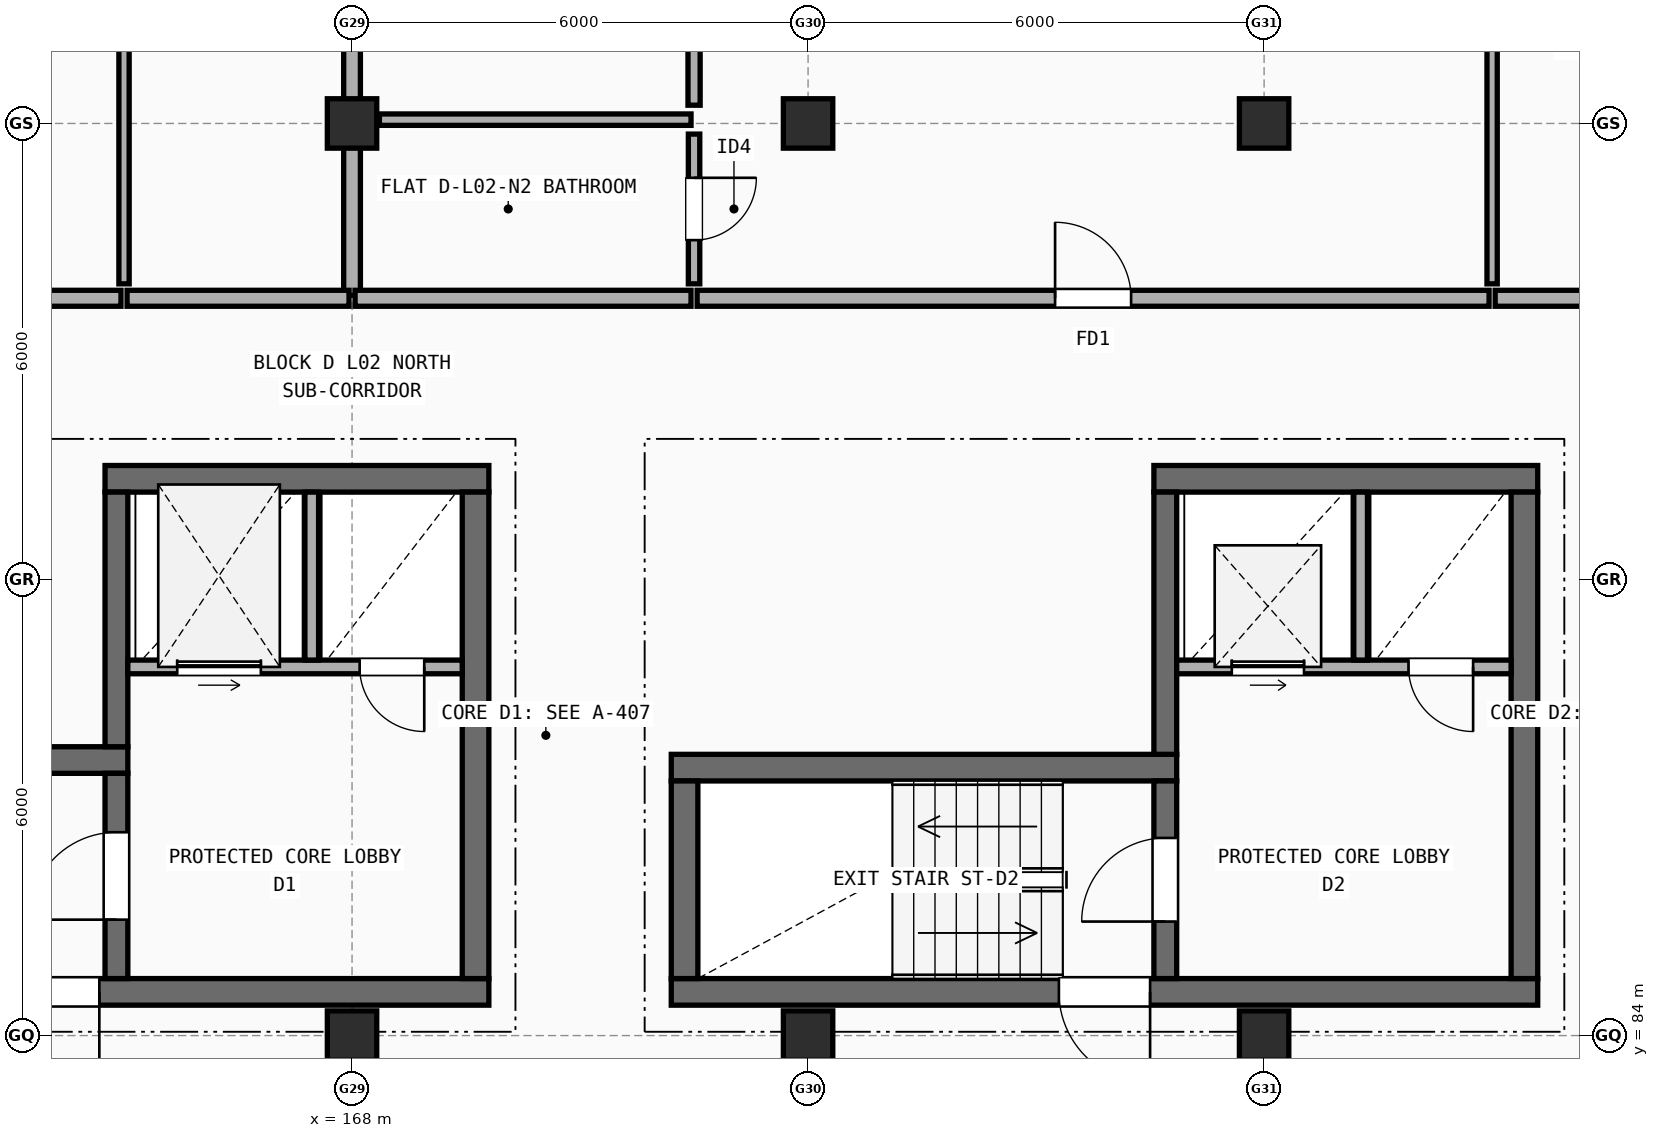
"""IFC4 building model, lengths in metres.
Left out: names, types, materials, properties, quantities, classifications, styles, units other than length and angle.
Written with IfcOpenShell. Run it as: python <this file> out.ifc"""

import sys

from ifc_helpers import new_model, si_unit, direction, frame, frame_2d, origin, origin_2d, place, context, subcontext, project, spatial, rectangle, extrude, element, fill, save


model = new_model("IFC4")
c1 = context("Model", 3, precision=1e-05, world=origin(), true_north=direction((0.0, 1.0)))
c2 = subcontext(c1, "Body", "Model", "MODEL_VIEW")
j1 = project(units=[si_unit("LENGTHUNIT", "METRE"), si_unit("PLANEANGLEUNIT", "RADIAN")], contexts=[c1])
p1 = place(None, origin())
s1 = spatial("IfcSite", under=j1, at=p1, CompositionType="ELEMENT")
p2 = place(p1, origin())
s2 = spatial("IfcBuilding", under=s1, at=p2, CompositionType="ELEMENT")
p3 = place(p2, frame((0.0, 0.0, 7.7)))
s3 = spatial("IfcBuildingStorey", under=s2, at=p3, CompositionType="ELEMENT", Elevation=7.7)
for number, where, z_axis, x_axis in (
    (1, (168.0, 84.0, 0.0), (0.0, 0.0, 1.0), (1.0, 0.0, 0.0)),
    (2, (168.0, 96.0, 0.0), (0.0, 0.0, 1.0), (1.0, 0.0, 0.0)),
    (3, (174.0, 84.0, 0.0), (0.0, 0.0, 1.0), (1.0, 0.0, 0.0)),
    (4, (174.0, 96.0, 0.0), (0.0, 0.0, 1.0), (1.0, 0.0, 0.0)),
    (5, (180.0, 84.0, 0.0), (0.0, 0.0, 1.0), (1.0, 0.0, 0.0)),
    (6, (180.0, 96.0, 0.0), (0.0, 0.0, 1.0), (1.0, 0.0, 0.0)),
):
    element("IfcColumn", number, at=place(p3, frame(where, z_axis=z_axis, x_axis=x_axis)), inside=s3, PredefinedType="COLUMN", context=c2, shape_type="SweptSolid", body=[
        extrude(rectangle(XDim=0.65, YDim=0.65, at=origin_2d()), origin(), (0.0, 0.0, 1.0), 2.955),
    ])
p4 = place(p3, frame((158.4, 84.575, 0.0), z_axis=(0.0, 0.0, 1.0), x_axis=(1.0, 0.0, 0.0)))
e7 = element("IfcWall", 7, at=p4, inside=s3, PredefinedType="SHEAR", context=c2, shape_type="SweptSolid", body=[
    extrude(rectangle(XDim=11.4, YDim=0.35, at=frame_2d((5.7, 0.0))), origin(), (0.0, 0.0, 1.0), 2.955),
])
p5 = place(p4, frame((5.125, 0.0, 0.0)))
e8 = element("IfcOpeningElement", 8, at=p5, cuts=e7, PredefinedType="OPENING", context=c2, shape_type="SweptSolid", body=[
    extrude(rectangle(XDim=1.15, YDim=2.15, at=frame_2d((0.575, 1.075))), frame((0.0, 0.185, 0.0), z_axis=(0.0, -1.0, 0.0), x_axis=(1.0, 0.0, 0.0)), (0.0, 0.0, 1.0), 0.37),
])
p6 = place(p3, frame((165.05, 87.625, 0.0), z_axis=(0.0, 0.0, 1.0), x_axis=(-1.0, 0.0, 0.0)))
e9 = element("IfcWall", 9, at=p6, inside=s3, PredefinedType="SHEAR", context=c2, shape_type="SweptSolid", body=[
    extrude(rectangle(XDim=6.65, YDim=0.35, at=frame_2d((3.325, 0.0))), origin(), (0.0, 0.0, 1.0), 2.955),
])
p7 = place(p3, frame((164.9, 84.75, 0.0), z_axis=(0.0, 0.0, 1.0), x_axis=(0.0, 1.0, 0.0)))
e10 = element("IfcWall", 10, at=p7, inside=s3, PredefinedType="SHEAR", context=c2, shape_type="SweptSolid", body=[
    extrude(rectangle(XDim=2.7, YDim=0.3, at=frame_2d((1.35, 0.0))), origin(), (0.0, 0.0, 1.0), 2.955),
])
p8 = place(p7, frame((0.775, 0.0, 0.0)))
e11 = element("IfcOpeningElement", 11, at=p8, cuts=e10, PredefinedType="OPENING", context=c2, shape_type="SweptSolid", body=[
    extrude(rectangle(XDim=1.15, YDim=2.15, at=frame_2d((0.575, 1.075))), frame((0.0, 0.16, 0.0), z_axis=(0.0, -1.0, 0.0), x_axis=(1.0, 0.0, 0.0)), (0.0, 0.0, 1.0), 0.32),
])
p9 = place(p3, frame((169.8, 91.325, 0.0), z_axis=(0.0, 0.0, 1.0), x_axis=(-1.0, 0.0, 0.0)))
e12 = element("IfcWall", 12, at=p9, inside=s3, PredefinedType="SHEAR", context=c2, shape_type="SweptSolid", body=[
    extrude(rectangle(XDim=5.05, YDim=0.35, at=frame_2d((2.525, 0.0))), origin(), (0.0, 0.0, 1.0), 2.955),
])
p10 = place(p3, frame((169.625, 84.75, 0.0), z_axis=(0.0, 0.0, 1.0), x_axis=(0.0, 1.0, 0.0)))
e13 = element("IfcWall", 13, at=p10, inside=s3, PredefinedType="SHEAR", context=c2, shape_type="SweptSolid", body=[
    extrude(rectangle(XDim=6.4, YDim=0.35, at=frame_2d((3.2, 0.0))), origin(), (0.0, 0.0, 1.0), 2.955),
])
p11 = place(p3, frame((164.9, 87.8, 0.0), z_axis=(0.0, 0.0, 1.0), x_axis=(0.0, 1.0, 0.0)))
e14 = element("IfcWall", 14, at=p11, inside=s3, PredefinedType="SHEAR", context=c2, shape_type="SweptSolid", body=[
    extrude(rectangle(XDim=3.35, YDim=0.3, at=frame_2d((1.675, 0.0))), origin(), (0.0, 0.0, 1.0), 2.955),
])
p12 = place(p3, frame((165.05, 88.85, 0.0), z_axis=(0.0, 0.0, 1.0), x_axis=(1.0, 0.0, 0.0)))
e15 = element("IfcWall", 15, at=p12, inside=s3, PredefinedType="SOLIDWALL", context=c2, shape_type="SweptSolid", body=[
    extrude(rectangle(XDim=4.4, YDim=0.18, at=frame_2d((2.2, 0.0))), origin(), (0.0, 0.0, 1.0), 2.955),
])
p13 = place(p12, frame((0.65, 0.0, 0.0)))
e16 = element("IfcOpeningElement", 16, at=p13, cuts=e15, PredefinedType="OPENING", context=c2, shape_type="SweptSolid", body=[
    extrude(rectangle(XDim=1.1, YDim=2.15, at=frame_2d((0.55, 1.075))), frame((0.0, 0.1, 0.0), z_axis=(0.0, -1.0, 0.0), x_axis=(1.0, 0.0, 0.0)), (0.0, 0.0, 1.0), 0.2),
])
p14 = place(p12, frame((3.05, 0.0, 0.0)))
e17 = element("IfcOpeningElement", 17, at=p14, cuts=e15, PredefinedType="OPENING", context=c2, shape_type="SweptSolid", body=[
    extrude(rectangle(XDim=0.85, YDim=2.1, at=frame_2d((0.425, 1.05))), frame((0.0, 0.1, 0.0), z_axis=(0.0, -1.0, 0.0), x_axis=(1.0, 0.0, 0.0)), (0.0, 0.0, 1.0), 0.2),
])
p15 = place(p3, frame((167.47, 88.94, 0.0), z_axis=(0.0, 0.0, 1.0), x_axis=(0.0, 1.0, 0.0)))
e18 = element("IfcWall", 18, at=p15, inside=s3, PredefinedType="SOLIDWALL", context=c2, shape_type="SweptSolid", body=[
    extrude(rectangle(XDim=2.21, YDim=0.18, at=frame_2d((1.105, 0.0))), origin(), (0.0, 0.0, 1.0), 2.955),
])
p16 = place(p3, frame((172.2, 84.575, 0.0), z_axis=(0.0, 0.0, 1.0), x_axis=(1.0, 0.0, 0.0)))
e19 = element("IfcWall", 19, at=p16, inside=s3, PredefinedType="SHEAR", context=c2, shape_type="SweptSolid", body=[
    extrude(rectangle(XDim=11.4, YDim=0.35, at=frame_2d((5.7, 0.0))), origin(), (0.0, 0.0, 1.0), 2.955),
])
p17 = place(p16, frame((5.1, 0.0, 0.0)))
e20 = element("IfcOpeningElement", 20, at=p17, cuts=e19, PredefinedType="OPENING", context=c2, shape_type="SweptSolid", body=[
    extrude(rectangle(XDim=1.2, YDim=2.15, at=frame_2d((0.6, 1.075))), frame((0.0, 0.185, 0.0), z_axis=(0.0, -1.0, 0.0), x_axis=(1.0, 0.0, 0.0)), (0.0, 0.0, 1.0), 0.37),
])
p18 = place(p3, frame((178.85, 87.525, 0.0), z_axis=(0.0, 0.0, 1.0), x_axis=(-1.0, 0.0, 0.0)))
e21 = element("IfcWall", 21, at=p18, inside=s3, PredefinedType="SHEAR", context=c2, shape_type="SweptSolid", body=[
    extrude(rectangle(XDim=6.65, YDim=0.35, at=frame_2d((3.325, 0.0))), origin(), (0.0, 0.0, 1.0), 2.955),
])
p19 = place(p3, frame((172.375, 87.35, 0.0), z_axis=(0.0, 0.0, 1.0), x_axis=(0.0, -1.0, 0.0)))
e22 = element("IfcWall", 22, at=p19, inside=s3, PredefinedType="SHEAR", context=c2, shape_type="SweptSolid", body=[
    extrude(rectangle(XDim=2.6, YDim=0.35, at=frame_2d((1.3, 0.0))), origin(), (0.0, 0.0, 1.0), 2.955),
])
p20 = place(p3, frame((178.7, 84.75, 0.0), z_axis=(0.0, 0.0, 1.0), x_axis=(0.0, 1.0, 0.0)))
e23 = element("IfcWall", 23, at=p20, inside=s3, PredefinedType="SHEAR", context=c2, shape_type="SweptSolid", body=[
    extrude(rectangle(XDim=2.6, YDim=0.3, at=frame_2d((1.3, 0.0))), origin(), (0.0, 0.0, 1.0), 2.955),
])
p21 = place(p20, frame((0.75, 0.0, 0.0)))
e24 = element("IfcOpeningElement", 24, at=p21, cuts=e23, PredefinedType="OPENING", context=c2, shape_type="SweptSolid", body=[
    extrude(rectangle(XDim=1.1, YDim=2.15, at=frame_2d((0.55, 1.075))), frame((0.0, 0.16, 0.0), z_axis=(0.0, -1.0, 0.0), x_axis=(1.0, 0.0, 0.0)), (0.0, 0.0, 1.0), 0.32),
])
p22 = place(p3, frame((183.6, 91.325, 0.0), z_axis=(0.0, 0.0, 1.0), x_axis=(-1.0, 0.0, 0.0)))
e25 = element("IfcWall", 25, at=p22, inside=s3, PredefinedType="SHEAR", context=c2, shape_type="SweptSolid", body=[
    extrude(rectangle(XDim=5.05, YDim=0.35, at=frame_2d((2.525, 0.0))), origin(), (0.0, 0.0, 1.0), 2.955),
])
p23 = place(p3, frame((183.425, 84.75, 0.0), z_axis=(0.0, 0.0, 1.0), x_axis=(0.0, 1.0, 0.0)))
e26 = element("IfcWall", 26, at=p23, inside=s3, PredefinedType="SHEAR", context=c2, shape_type="SweptSolid", body=[
    extrude(rectangle(XDim=6.4, YDim=0.35, at=frame_2d((3.2, 0.0))), origin(), (0.0, 0.0, 1.0), 2.955),
])
p24 = place(p3, frame((178.7, 87.7, 0.0), z_axis=(0.0, 0.0, 1.0), x_axis=(0.0, 1.0, 0.0)))
e27 = element("IfcWall", 27, at=p24, inside=s3, PredefinedType="SHEAR", context=c2, shape_type="SweptSolid", body=[
    extrude(rectangle(XDim=3.45, YDim=0.3, at=frame_2d((1.725, 0.0))), origin(), (0.0, 0.0, 1.0), 2.955),
])
p25 = place(p3, frame((178.85, 88.85, 0.0), z_axis=(0.0, 0.0, 1.0), x_axis=(1.0, 0.0, 0.0)))
e28 = element("IfcWall", 28, at=p25, inside=s3, PredefinedType="SOLIDWALL", context=c2, shape_type="SweptSolid", body=[
    extrude(rectangle(XDim=4.4, YDim=0.18, at=frame_2d((2.2, 0.0))), origin(), (0.0, 0.0, 1.0), 2.955),
])
p26 = place(p25, frame((0.725, 0.0, 0.0)))
e29 = element("IfcOpeningElement", 29, at=p26, cuts=e28, PredefinedType="OPENING", context=c2, shape_type="SweptSolid", body=[
    extrude(rectangle(XDim=0.95, YDim=2.15, at=frame_2d((0.475, 1.075))), frame((0.0, 0.1, 0.0), z_axis=(0.0, -1.0, 0.0), x_axis=(1.0, 0.0, 0.0)), (0.0, 0.0, 1.0), 0.2),
])
p27 = place(p25, frame((3.05, 0.0, 0.0)))
e30 = element("IfcOpeningElement", 30, at=p27, cuts=e28, PredefinedType="OPENING", context=c2, shape_type="SweptSolid", body=[
    extrude(rectangle(XDim=0.85, YDim=2.1, at=frame_2d((0.425, 1.05))), frame((0.0, 0.1, 0.0), z_axis=(0.0, -1.0, 0.0), x_axis=(1.0, 0.0, 0.0)), (0.0, 0.0, 1.0), 0.2),
])
p28 = place(p3, frame((181.27, 88.94, 0.0), z_axis=(0.0, 0.0, 1.0), x_axis=(0.0, 1.0, 0.0)))
e31 = element("IfcWall", 31, at=p28, inside=s3, PredefinedType="SOLIDWALL", context=c2, shape_type="SweptSolid", body=[
    extrude(rectangle(XDim=2.21, YDim=0.18, at=frame_2d((1.105, 0.0))), origin(), (0.0, 0.0, 1.0), 2.955),
])
p29 = place(p3, frame((168.0, 93.74, 0.0), z_axis=(0.0, 0.0, 1.0), x_axis=(0.0, 1.0, 0.0)))
e32 = element("IfcWall", 32, at=p29, inside=s3, PredefinedType="SOLIDWALL", context=c2, shape_type="SweptSolid", body=[
    extrude(rectangle(XDim=13.87, YDim=0.22, at=frame_2d((6.935, 0.0))), origin(), (0.0, 0.0, 1.0), 2.337),
])
p30 = place(p3, frame((154.54, 93.7, 0.0), z_axis=(0.0, 0.0, 1.0), x_axis=(1.0, 0.0, 0.0)))
e33 = element("IfcWall", 33, at=p30, inside=s3, PredefinedType="SOLIDWALL", context=c2, shape_type="SweptSolid", body=[
    extrude(rectangle(XDim=10.42, YDim=0.21, at=frame_2d((5.21, 0.0))), origin(), (0.0, 0.0, 1.0), 2.437),
])
p31 = place(p30, frame((4.72, 0.0, 0.0)))
e34 = element("IfcOpeningElement", 34, at=p31, cuts=e33, PredefinedType="OPENING", context=c2, shape_type="SweptSolid", body=[
    extrude(rectangle(XDim=0.98, YDim=2.15, at=frame_2d((0.49, 1.075))), frame((0.0, 0.115, 0.0), z_axis=(0.0, -1.0, 0.0), x_axis=(1.0, 0.0, 0.0)), (0.0, 0.0, 1.0), 0.23),
])
p32 = place(p3, frame((165.04, 93.7, 0.0), z_axis=(0.0, 0.0, 1.0), x_axis=(1.0, 0.0, 0.0)))
e35 = element("IfcWall", 35, at=p32, inside=s3, PredefinedType="SOLIDWALL", context=c2, shape_type="SweptSolid", body=[
    extrude(rectangle(XDim=2.92, YDim=0.21, at=frame_2d((1.46, 0.0))), origin(), (0.0, 0.0, 1.0), 2.508),
])
p33 = place(p3, frame((165.0, 93.89, 0.0), z_axis=(0.0, 0.0, 1.0), x_axis=(0.0, 1.0, 0.0)))
e36 = element("IfcWall", 36, at=p33, inside=s3, PredefinedType="PARTITIONING", context=c2, shape_type="SweptSolid", body=[
    extrude(rectangle(XDim=13.92, YDim=0.135, at=frame_2d((6.96, 0.0))), origin(), (0.0, 0.0, 1.0), 2.387),
])
p34 = place(p33, frame((6.65, 0.0, 0.0)))
e37 = element("IfcOpeningElement", 37, at=p34, cuts=e36, PredefinedType="OPENING", context=c2, shape_type="SweptSolid", body=[
    extrude(rectangle(XDim=0.9, YDim=2.1, at=frame_2d((0.45, 1.05))), frame((0.0, 0.077, 0.0), z_axis=(0.0, -1.0, 0.0), x_axis=(1.0, 0.0, 0.0)), (0.0, 0.0, 1.0), 0.155),
])
p35 = place(p3, frame((168.04, 93.7, 0.0), z_axis=(0.0, 0.0, 1.0), x_axis=(1.0, 0.0, 0.0)))
e38 = element("IfcWall", 38, at=p35, inside=s3, PredefinedType="SOLIDWALL", context=c2, shape_type="SweptSolid", body=[
    extrude(rectangle(XDim=4.42, YDim=0.21, at=frame_2d((2.21, 0.0))), origin(), (0.0, 0.0, 1.0), 2.508),
])
p36 = place(p3, frame((172.54, 93.7, 0.0), z_axis=(0.0, 0.0, 1.0), x_axis=(1.0, 0.0, 0.0)))
e39 = element("IfcWall", 39, at=p36, inside=s3, PredefinedType="SOLIDWALL", context=c2, shape_type="SweptSolid", body=[
    extrude(rectangle(XDim=10.42, YDim=0.21, at=frame_2d((5.21, 0.0))), origin(), (0.0, 0.0, 1.0), 2.955),
])
p37 = place(p36, frame((4.71, 0.0, 0.0)))
e40 = element("IfcOpeningElement", 40, at=p37, cuts=e39, PredefinedType="OPENING", context=c2, shape_type="SweptSolid", body=[
    extrude(rectangle(XDim=1.0, YDim=2.15, at=frame_2d((0.5, 1.075))), frame((0.0, 0.115, 0.0), z_axis=(0.0, -1.0, 0.0), x_axis=(1.0, 0.0, 0.0)), (0.0, 0.0, 1.0), 0.23),
])
p38 = place(p3, frame((172.5, 96.24, 0.0), z_axis=(0.0, 0.0, 1.0), x_axis=(0.0, 1.0, 0.0)))
e41 = element("IfcWall", 41, at=p38, inside=s3, PredefinedType="PLUMBINGWALL", context=c2, shape_type="SweptSolid", body=[
    extrude(rectangle(XDim=7.37, YDim=0.16, at=frame_2d((3.685, 0.0))), origin(), (0.0, 0.0, 1.0), 2.437),
])
p39 = place(p38, frame((3.245, 0.0, 0.0)))
e42 = element("IfcOpeningElement", 42, at=p39, cuts=e41, PredefinedType="OPENING", context=c2, shape_type="SweptSolid", body=[
    extrude(rectangle(XDim=0.88, YDim=2.1, at=frame_2d((0.44, 1.05))), frame((0.0, 0.09, 0.0), z_axis=(0.0, -1.0, 0.0), x_axis=(1.0, 0.0, 0.0)), (0.0, 0.0, 1.0), 0.18),
])
p40 = place(p3, frame((172.5, 93.89, 0.0), z_axis=(0.0, 0.0, 1.0), x_axis=(0.0, 1.0, 0.0)))
e43 = element("IfcWall", 43, at=p40, inside=s3, PredefinedType="PARTITIONING", context=c2, shape_type="SweptSolid", body=[
    extrude(rectangle(XDim=1.97, YDim=0.15, at=frame_2d((0.985, 0.0))), origin(), (0.0, 0.0, 1.0), 2.955),
])
p41 = place(p40, frame((0.575, 0.0, 0.0)))
e44 = element("IfcOpeningElement", 44, at=p41, cuts=e43, PredefinedType="OPENING", context=c2, shape_type="SweptSolid", body=[
    extrude(rectangle(XDim=0.82, YDim=2.08, at=frame_2d((0.41, 1.04))), frame((0.0, 0.085, 0.0), z_axis=(0.0, -1.0, 0.0), x_axis=(1.0, 0.0, 0.0)), (0.0, 0.0, 1.0), 0.17),
])
p42 = place(p3, frame((168.36, 96.05, 0.0), z_axis=(0.0, 0.0, 1.0), x_axis=(1.0, 0.0, 0.0)))
e45 = element("IfcWall", 45, at=p42, inside=s3, PredefinedType="PARTITIONING", context=c2, shape_type="SweptSolid", body=[
    extrude(rectangle(XDim=4.1, YDim=0.15, at=frame_2d((2.05, 0.0))), origin(), (0.0, 0.0, 1.0), 2.387),
])
p43 = place(p3, frame((183.04, 93.7, 0.0), z_axis=(0.0, 0.0, 1.0), x_axis=(1.0, 0.0, 0.0)))
e46 = element("IfcWall", 46, at=p43, inside=s3, PredefinedType="SOLIDWALL", context=c2, shape_type="SweptSolid", body=[
    extrude(rectangle(XDim=2.92, YDim=0.21, at=frame_2d((1.46, 0.0))), origin(), (0.0, 0.0, 1.0), 2.437),
])
p44 = place(p3, frame((183.0, 93.89, 0.0), z_axis=(0.0, 0.0, 1.0), x_axis=(0.0, 1.0, 0.0)))
e47 = element("IfcWall", 47, at=p44, inside=s3, PredefinedType="PARTITIONING", context=c2, shape_type="SweptSolid", body=[
    extrude(rectangle(XDim=13.92, YDim=0.135, at=frame_2d((6.96, 0.0))), origin(), (0.0, 0.0, 1.0), 2.387),
])
p45 = place(p44, frame((6.65, 0.0, 0.0)))
e48 = element("IfcOpeningElement", 48, at=p45, cuts=e47, PredefinedType="OPENING", context=c2, shape_type="SweptSolid", body=[
    extrude(rectangle(XDim=0.88, YDim=2.1, at=frame_2d((0.44, 1.05))), frame((0.0, 0.077, 0.0), z_axis=(0.0, -1.0, 0.0), x_axis=(1.0, 0.0, 0.0)), (0.0, 0.0, 1.0), 0.155),
])
p46 = place(p5, origin())
e49 = element("IfcDoor", 49, at=p46, inside=s3, OperationType="SINGLE_SWING_RIGHT", PredefinedType="DOOR", context=c2, shape_type="SweptSolid", body=[
    extrude(rectangle(XDim=1.15, YDim=2.15, at=frame_2d((0.575, 1.075))), frame((0.0, 0.025, 0.0), z_axis=(0.0, -1.0, 0.0), x_axis=(1.0, 0.0, 0.0)), (0.0, 0.0, 1.0), 0.05),
])
fill(e8, e49)
p47 = place(p8, origin())
e50 = element("IfcDoor", 50, at=p47, inside=s3, OperationType="SINGLE_SWING_LEFT", PredefinedType="DOOR", context=c2, shape_type="SweptSolid", body=[
    extrude(rectangle(XDim=1.15, YDim=2.15, at=frame_2d((0.575, 1.075))), frame((0.0, 0.025, 0.0), z_axis=(0.0, -1.0, 0.0), x_axis=(1.0, 0.0, 0.0)), (0.0, 0.0, 1.0), 0.05),
])
fill(e11, e50)
p48 = place(p13, origin())
e51 = element("IfcDoor", 51, at=p48, inside=s3, OperationType="SLIDING_TO_LEFT", PredefinedType="DOOR", context=c2, shape_type="SweptSolid", body=[
    extrude(rectangle(XDim=1.1, YDim=2.15, at=frame_2d((0.55, 1.075))), frame((0.0, 0.025, 0.0), z_axis=(0.0, -1.0, 0.0), x_axis=(1.0, 0.0, 0.0)), (0.0, 0.0, 1.0), 0.05),
])
fill(e16, e51)
p49 = place(p14, frame((0.85, 0.0, 0.0), z_axis=(0.0, 0.0, 1.0), x_axis=(-1.0, 0.0, 0.0)))
e52 = element("IfcDoor", 52, at=p49, inside=s3, OperationType="SINGLE_SWING_RIGHT", PredefinedType="DOOR", context=c2, shape_type="SweptSolid", body=[
    extrude(rectangle(XDim=0.85, YDim=2.1, at=frame_2d((0.425, 1.05))), frame((0.0, 0.025, 0.0), z_axis=(0.0, -1.0, 0.0), x_axis=(1.0, 0.0, 0.0)), (0.0, 0.0, 1.0), 0.05),
])
fill(e17, e52)
p50 = place(p17, origin())
e53 = element("IfcDoor", 53, at=p50, inside=s3, OperationType="SINGLE_SWING_RIGHT", PredefinedType="DOOR", context=c2, shape_type="SweptSolid", body=[
    extrude(rectangle(XDim=1.2, YDim=2.15, at=frame_2d((0.6, 1.075))), frame((0.0, 0.025, 0.0), z_axis=(0.0, -1.0, 0.0), x_axis=(1.0, 0.0, 0.0)), (0.0, 0.0, 1.0), 0.05),
])
fill(e20, e53)
p51 = place(p21, origin())
e54 = element("IfcDoor", 54, at=p51, inside=s3, OperationType="SINGLE_SWING_LEFT", PredefinedType="DOOR", context=c2, shape_type="SweptSolid", body=[
    extrude(rectangle(XDim=1.1, YDim=2.15, at=frame_2d((0.55, 1.075))), frame((0.0, 0.025, 0.0), z_axis=(0.0, -1.0, 0.0), x_axis=(1.0, 0.0, 0.0)), (0.0, 0.0, 1.0), 0.05),
])
fill(e24, e54)
p52 = place(p26, origin())
e55 = element("IfcDoor", 55, at=p52, inside=s3, OperationType="SLIDING_TO_LEFT", PredefinedType="DOOR", context=c2, shape_type="SweptSolid", body=[
    extrude(rectangle(XDim=0.95, YDim=2.15, at=frame_2d((0.475, 1.075))), frame((0.0, 0.025, 0.0), z_axis=(0.0, -1.0, 0.0), x_axis=(1.0, 0.0, 0.0)), (0.0, 0.0, 1.0), 0.05),
])
fill(e29, e55)
p53 = place(p27, frame((0.85, 0.0, 0.0), z_axis=(0.0, 0.0, 1.0), x_axis=(-1.0, 0.0, 0.0)))
e56 = element("IfcDoor", 56, at=p53, inside=s3, OperationType="SINGLE_SWING_RIGHT", PredefinedType="DOOR", context=c2, shape_type="SweptSolid", body=[
    extrude(rectangle(XDim=0.85, YDim=2.1, at=frame_2d((0.425, 1.05))), frame((0.0, 0.025, 0.0), z_axis=(0.0, -1.0, 0.0), x_axis=(1.0, 0.0, 0.0)), (0.0, 0.0, 1.0), 0.05),
])
fill(e30, e56)
p54 = place(p37, origin())
e57 = element("IfcDoor", 57, at=p54, inside=s3, OperationType="SINGLE_SWING_LEFT", PredefinedType="DOOR", context=c2, shape_type="SweptSolid", body=[
    extrude(rectangle(XDim=1.0, YDim=2.15, at=frame_2d((0.5, 1.075))), frame((0.0, 0.025, 0.0), z_axis=(0.0, -1.0, 0.0), x_axis=(1.0, 0.0, 0.0)), (0.0, 0.0, 1.0), 0.05),
])
fill(e40, e57)
p55 = place(p41, origin())
e58 = element("IfcDoor", 58, at=p55, inside=s3, OperationType="SINGLE_SWING_RIGHT", PredefinedType="DOOR", context=c2, shape_type="SweptSolid", body=[
    extrude(rectangle(XDim=0.82, YDim=2.08, at=frame_2d((0.41, 1.04))), frame((0.0, 0.025, 0.0), z_axis=(0.0, -1.0, 0.0), x_axis=(1.0, 0.0, 0.0)), (0.0, 0.0, 1.0), 0.05),
])
fill(e44, e58)
save(model, sys.argv[1])
